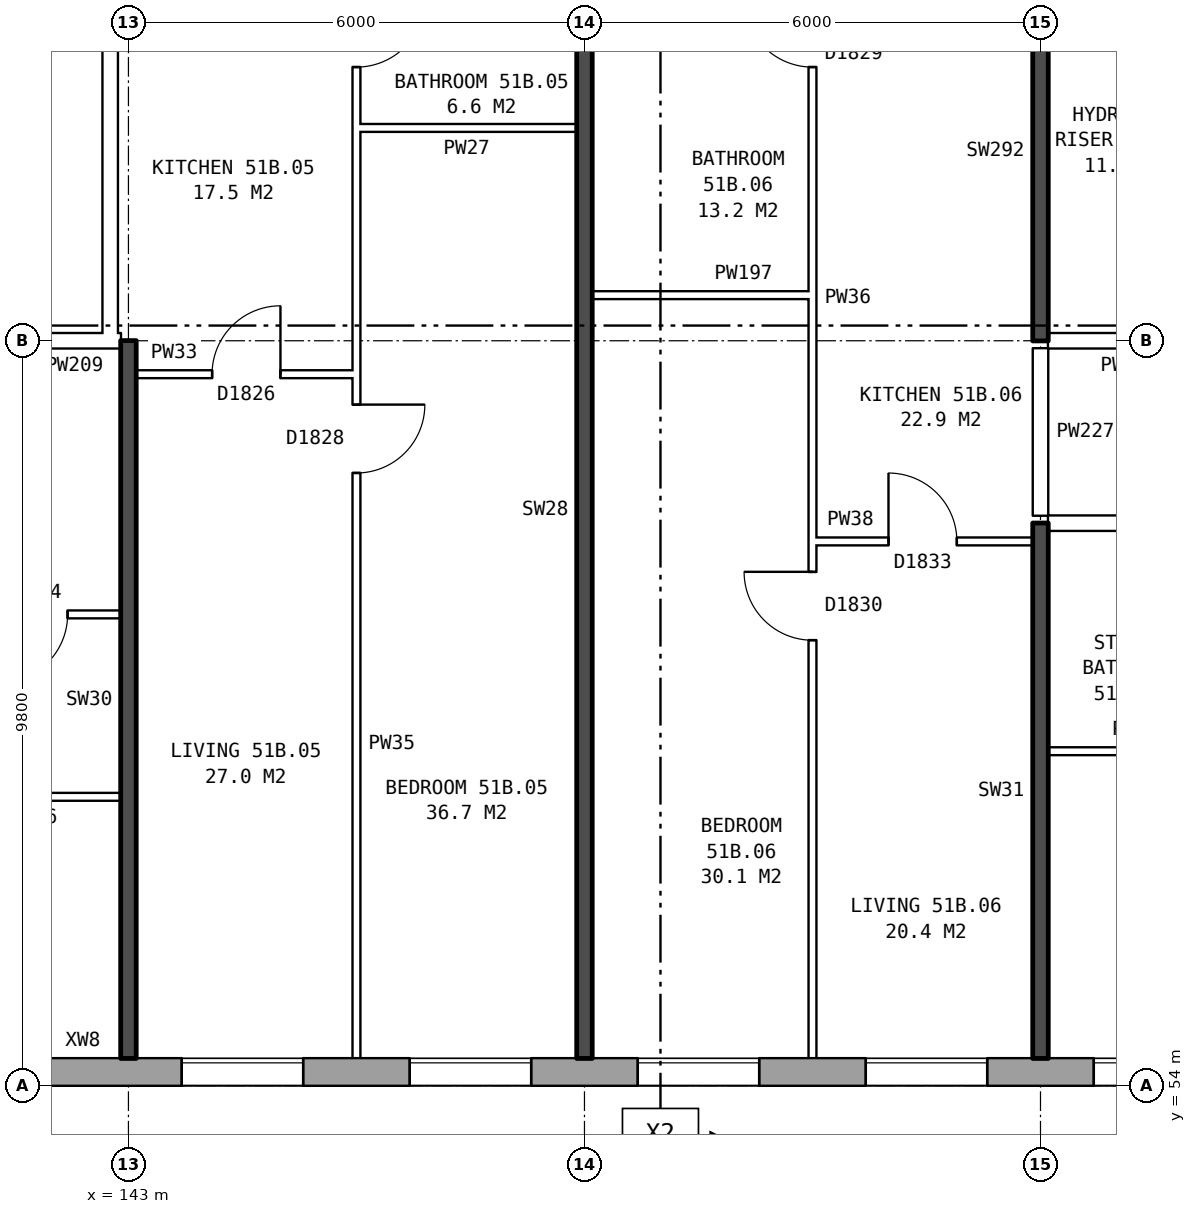
"""IFC4 building model, lengths in metres.
Left out: names, types, materials, properties, quantities, classifications, styles, units other than length and angle.
Written with IfcOpenShell. Run it as: python <this file> out.ifc"""

import sys

from ifc_helpers import new_model, si_unit, direction, frame, frame_2d, origin, place, context, subcontext, project, spatial, rectangle, extrude, element, fill, save


model = new_model("IFC4")
c1 = context("Model", 3, precision=1e-05, world=origin(), true_north=direction((0.0, 1.0)))
c2 = subcontext(c1, "Body", "Model", "MODEL_VIEW")
j1 = project(units=[si_unit("LENGTHUNIT", "METRE"), si_unit("PLANEANGLEUNIT", "RADIAN")], contexts=[c1])
p1 = place(None, origin())
s1 = spatial("IfcSite", under=j1, at=p1, CompositionType="ELEMENT")
p2 = place(p1, origin())
s2 = spatial("IfcBuilding", under=s1, at=p2, CompositionType="ELEMENT")
p3 = place(p2, frame((0.0, 0.0, 182.0)))
s3 = spatial("IfcBuildingStorey", under=s2, at=p3, CompositionType="ELEMENT", Elevation=182.0)
p4 = place(p3, frame((134.075, 54.18, 0.0), z_axis=(0.0, 0.0, 1.0), x_axis=(1.0, 0.0, 0.0)))
e1 = element("IfcWall", 1, at=p4, inside=s3, PredefinedType="STANDARD", context=c2, shape_type="SweptSolid", body=[
    extrude(rectangle(XDim=33.101, YDim=0.36, at=frame_2d((16.55, 0.0))), origin(), (0.0, 0.0, 1.0), 2.85),
])
p5 = place(p4, frame((0.625, 0.0, 0.8)))
e2 = element("IfcOpeningElement", 2, at=p5, cuts=e1, PredefinedType="OPENING", context=c2, shape_type="SweptSolid", body=[
    extrude(rectangle(XDim=1.6, YDim=1.8, at=frame_2d((0.8, 0.9))), frame((0.0, 0.19, 0.0), z_axis=(0.0, -1.0, 0.0), x_axis=(1.0, 0.0, 0.0)), (0.0, 0.0, 1.0), 0.38),
])
p6 = place(p4, frame((3.625, 0.0, 0.8)))
e3 = element("IfcOpeningElement", 3, at=p6, cuts=e1, PredefinedType="OPENING", context=c2, shape_type="SweptSolid", body=[
    extrude(rectangle(XDim=1.6, YDim=1.8, at=frame_2d((0.8, 0.9))), frame((0.0, 0.19, 0.0), z_axis=(0.0, -1.0, 0.0), x_axis=(1.0, 0.0, 0.0)), (0.0, 0.0, 1.0), 0.38),
])
p7 = place(p4, frame((5.525, 0.0, 0.8)))
e4 = element("IfcOpeningElement", 4, at=p7, cuts=e1, PredefinedType="OPENING", context=c2, shape_type="SweptSolid", body=[
    extrude(rectangle(XDim=0.6, YDim=1.8, at=frame_2d((0.3, 0.9))), frame((0.0, 0.19, 0.0), z_axis=(0.0, -1.0, 0.0), x_axis=(1.0, 0.0, 0.0)), (0.0, 0.0, 1.0), 0.38),
])
p8 = place(p4, frame((9.625, 0.0, 0.8)))
e5 = element("IfcOpeningElement", 5, at=p8, cuts=e1, PredefinedType="OPENING", context=c2, shape_type="SweptSolid", body=[
    extrude(rectangle(XDim=1.6, YDim=1.8, at=frame_2d((0.8, 0.9))), frame((0.0, 0.19, 0.0), z_axis=(0.0, -1.0, 0.0), x_axis=(1.0, 0.0, 0.0)), (0.0, 0.0, 1.0), 0.38),
])
p9 = place(p4, frame((12.625, 0.0, 0.8)))
e6 = element("IfcOpeningElement", 6, at=p9, cuts=e1, PredefinedType="OPENING", context=c2, shape_type="SweptSolid", body=[
    extrude(rectangle(XDim=1.6, YDim=1.8, at=frame_2d((0.8, 0.9))), frame((0.0, 0.19, 0.0), z_axis=(0.0, -1.0, 0.0), x_axis=(1.0, 0.0, 0.0)), (0.0, 0.0, 1.0), 0.38),
])
p10 = place(p4, frame((15.625, 0.0, 0.8)))
e7 = element("IfcOpeningElement", 7, at=p10, cuts=e1, PredefinedType="OPENING", context=c2, shape_type="SweptSolid", body=[
    extrude(rectangle(XDim=1.6, YDim=1.8, at=frame_2d((0.8, 0.9))), frame((0.0, 0.19, 0.0), z_axis=(0.0, -1.0, 0.0), x_axis=(1.0, 0.0, 0.0)), (0.0, 0.0, 1.0), 0.38),
])
p11 = place(p4, frame((18.625, 0.0, 0.8)))
e8 = element("IfcOpeningElement", 8, at=p11, cuts=e1, PredefinedType="OPENING", context=c2, shape_type="SweptSolid", body=[
    extrude(rectangle(XDim=1.6, YDim=1.8, at=frame_2d((0.8, 0.9))), frame((0.0, 0.19, 0.0), z_axis=(0.0, -1.0, 0.0), x_axis=(1.0, 0.0, 0.0)), (0.0, 0.0, 1.0), 0.38),
])
p12 = place(p4, frame((21.625, 0.0, 0.8)))
e9 = element("IfcOpeningElement", 9, at=p12, cuts=e1, PredefinedType="OPENING", context=c2, shape_type="SweptSolid", body=[
    extrude(rectangle(XDim=1.6, YDim=1.8, at=frame_2d((0.8, 0.9))), frame((0.0, 0.19, 0.0), z_axis=(0.0, -1.0, 0.0), x_axis=(1.0, 0.0, 0.0)), (0.0, 0.0, 1.0), 0.38),
])
p13 = place(p4, frame((23.525, 0.0, 0.8)))
e10 = element("IfcOpeningElement", 10, at=p13, cuts=e1, PredefinedType="OPENING", context=c2, shape_type="SweptSolid", body=[
    extrude(rectangle(XDim=1.4, YDim=0.9, at=frame_2d((0.7, 0.45))), frame((0.0, 0.19, 0.0), z_axis=(0.0, -1.0, 0.0), x_axis=(1.0, 0.0, 0.0)), (0.0, 0.0, 1.0), 0.38),
])
p14 = place(p4, frame((27.625, 0.0, 0.8)))
e11 = element("IfcOpeningElement", 11, at=p14, cuts=e1, PredefinedType="OPENING", context=c2, shape_type="SweptSolid", body=[
    extrude(rectangle(XDim=1.6, YDim=1.8, at=frame_2d((0.8, 0.9))), frame((0.0, 0.19, 0.0), z_axis=(0.0, -1.0, 0.0), x_axis=(1.0, 0.0, 0.0)), (0.0, 0.0, 1.0), 0.38),
])
p15 = place(p4, frame((30.625, 0.0, 0.8)))
e12 = element("IfcOpeningElement", 12, at=p15, cuts=e1, PredefinedType="OPENING", context=c2, shape_type="SweptSolid", body=[
    extrude(rectangle(XDim=1.6, YDim=1.8, at=frame_2d((0.8, 0.9))), frame((0.0, 0.19, 0.0), z_axis=(0.0, -1.0, 0.0), x_axis=(1.0, 0.0, 0.0)), (0.0, 0.0, 1.0), 0.38),
])
p16 = place(p4, frame((6.425, 0.0, 1.6)))
e13 = element("IfcOpeningElement", 13, at=p16, cuts=e1, PredefinedType="OPENING", context=c2, shape_type="SweptSolid", body=[
    extrude(rectangle(XDim=0.6, YDim=0.9, at=frame_2d((0.3, 0.45))), frame((0.0, 0.19, 0.0), z_axis=(0.0, -1.0, 0.0), x_axis=(1.0, 0.0, 0.0)), (0.0, 0.0, 1.0), 0.38),
])
p17 = place(p4, frame((25.975, 0.0, 1.7)))
e14 = element("IfcOpeningElement", 14, at=p17, cuts=e1, PredefinedType="OPENING", context=c2, shape_type="SweptSolid", body=[
    extrude(rectangle(XDim=0.6, YDim=0.9, at=frame_2d((0.3, 0.45))), frame((0.0, 0.19, 0.0), z_axis=(0.0, -1.0, 0.0), x_axis=(1.0, 0.0, 0.0)), (0.0, 0.0, 1.0), 0.38),
])
p18 = place(p3, frame((142.76, 63.9, 0.0), z_axis=(0.0, 0.0, 1.0), x_axis=(0.0, 1.0, 0.0)))
e15 = element("IfcWall", 15, at=p18, inside=s3, PredefinedType="PARTITIONING", context=c2, shape_type="SweptSolid", body=[
    extrude(rectangle(XDim=12.2, YDim=0.2, at=frame_2d((6.1, 0.0))), origin(), (0.0, 0.0, 1.0), 2.85),
])
p19 = place(p18, frame((5.1, 0.0, 0.0)))
e16 = element("IfcOpeningElement", 16, at=p19, cuts=e15, PredefinedType="OPENING", context=c2, shape_type="SweptSolid", body=[
    extrude(rectangle(XDim=2.0, YDim=2.1, at=frame_2d((1.0, 1.05))), frame((0.0, 0.11, 0.0), z_axis=(0.0, -1.0, 0.0), x_axis=(1.0, 0.0, 0.0)), (0.0, 0.0, 1.0), 0.22),
])
for number, where, z_axis, x_axis in (
    (17, (140.6, 57.8, 0.0), (0.0, 0.0, 1.0), (1.0, 0.0, 0.0)),
    (18, (155.1, 58.4, 0.0), (0.0, 0.0, 1.0), (1.0, 0.0, 0.0)),
):
    element("IfcWall", number, at=place(p3, frame(where, z_axis=z_axis, x_axis=x_axis)), inside=s3, PredefinedType="PARTITIONING", context=c2, shape_type="SweptSolid", body=[
        extrude(rectangle(XDim=2.3, YDim=0.1, at=frame_2d((1.15, 0.0))), origin(), (0.0, 0.0, 1.0), 2.85),
    ])
p20 = place(p3, frame((137.1, 60.2, 0.0), z_axis=(0.0, 0.0, 1.0), x_axis=(1.0, 0.0, 0.0)))
e19 = element("IfcWall", 19, at=p20, inside=s3, PredefinedType="PARTITIONING", context=c2, shape_type="SweptSolid", body=[
    extrude(rectangle(XDim=5.8, YDim=0.1, at=frame_2d((2.9, 0.0))), origin(), (0.0, 0.0, 1.0), 2.85),
])
p21 = place(p20, frame((1.3, 0.0, 0.0)))
e20 = element("IfcOpeningElement", 20, at=p21, cuts=e19, PredefinedType="OPENING", context=c2, shape_type="SweptSolid", body=[
    extrude(rectangle(XDim=0.9, YDim=2.1, at=frame_2d((0.45, 1.05))), frame((0.0, 0.06, 0.0), z_axis=(0.0, -1.0, 0.0), x_axis=(1.0, 0.0, 0.0)), (0.0, 0.0, 1.0), 0.12),
])
p22 = place(p20, frame((4.2, 0.0, 0.0)))
e21 = element("IfcOpeningElement", 21, at=p22, cuts=e19, PredefinedType="OPENING", context=c2, shape_type="SweptSolid", body=[
    extrude(rectangle(XDim=0.9, YDim=2.1, at=frame_2d((0.45, 1.05))), frame((0.0, 0.06, 0.0), z_axis=(0.0, -1.0, 0.0), x_axis=(1.0, 0.0, 0.0)), (0.0, 0.0, 1.0), 0.12),
])
p23 = place(p3, frame((152.0, 61.16, 0.0), z_axis=(0.0, 0.0, 1.0), x_axis=(1.0, 0.0, 0.0)))
e22 = element("IfcWall", 22, at=p23, inside=s3, PredefinedType="PARTITIONING", context=c2, shape_type="SweptSolid", body=[
    extrude(rectangle(XDim=2.9, YDim=0.1, at=frame_2d((1.45, 0.0))), origin(), (0.0, 0.0, 1.0), 2.85),
])
p24 = place(p23, frame((1.0, 0.0, 0.0)))
e23 = element("IfcOpeningElement", 23, at=p24, cuts=e22, PredefinedType="OPENING", context=c2, shape_type="SweptSolid", body=[
    extrude(rectangle(XDim=0.9, YDim=2.1, at=frame_2d((0.45, 1.05))), frame((0.0, 0.06, 0.0), z_axis=(0.0, -1.0, 0.0), x_axis=(1.0, 0.0, 0.0)), (0.0, 0.0, 1.0), 0.12),
])
p25 = place(p3, frame((155.1, 61.4, 0.0), z_axis=(0.0, 0.0, 1.0), x_axis=(1.0, 0.0, 0.0)))
e24 = element("IfcWall", 24, at=p25, inside=s3, PredefinedType="PARTITIONING", context=c2, shape_type="SweptSolid", body=[
    extrude(rectangle(XDim=14.79, YDim=0.2, at=frame_2d((7.395, 0.0))), origin(), (0.0, 0.0, 1.0), 2.85),
])
p26 = place(p25, frame((3.6, 0.0, 0.0)))
e25 = element("IfcOpeningElement", 25, at=p26, cuts=e24, PredefinedType="OPENING", context=c2, shape_type="SweptSolid", body=[
    extrude(rectangle(XDim=1.0, YDim=2.1, at=frame_2d((0.5, 1.05))), frame((0.0, 0.11, 0.0), z_axis=(0.0, -1.0, 0.0), x_axis=(1.0, 0.0, 0.0)), (0.0, 0.0, 1.0), 0.22),
])
p27 = place(p25, frame((11.045, 0.0, 0.0)))
e26 = element("IfcOpeningElement", 26, at=p27, cuts=e24, PredefinedType="OPENING", context=c2, shape_type="SweptSolid", body=[
    extrude(rectangle(XDim=1.0, YDim=2.1, at=frame_2d((0.5, 1.05))), frame((0.0, 0.11, 0.0), z_axis=(0.0, -1.0, 0.0), x_axis=(1.0, 0.0, 0.0)), (0.0, 0.0, 1.0), 0.22),
])
p28 = place(p3, frame((143.1, 63.36, 0.0), z_axis=(0.0, 0.0, 1.0), x_axis=(1.0, 0.0, 0.0)))
e27 = element("IfcWall", 27, at=p28, inside=s3, PredefinedType="PARTITIONING", context=c2, shape_type="SweptSolid", body=[
    extrude(rectangle(XDim=2.9, YDim=0.1, at=frame_2d((1.45, 0.0))), origin(), (0.0, 0.0, 1.0), 2.85),
])
p29 = place(p28, frame((1.0, 0.0, 0.0)))
e28 = element("IfcOpeningElement", 28, at=p29, cuts=e27, PredefinedType="OPENING", context=c2, shape_type="SweptSolid", body=[
    extrude(rectangle(XDim=0.9, YDim=2.1, at=frame_2d((0.45, 1.05))), frame((0.0, 0.06, 0.0), z_axis=(0.0, -1.0, 0.0), x_axis=(1.0, 0.0, 0.0)), (0.0, 0.0, 1.0), 0.12),
])
p30 = place(p3, frame((139.76, 63.8, 0.0), z_axis=(0.0, 0.0, 1.0), x_axis=(1.0, 0.0, 0.0)))
e29 = element("IfcWall", 29, at=p30, inside=s3, PredefinedType="PARTITIONING", context=c2, shape_type="SweptSolid", body=[
    extrude(rectangle(XDim=3.0, YDim=0.2, at=frame_2d((1.5, 0.0))), origin(), (0.0, 0.0, 1.0), 2.85),
])
p31 = place(p30, frame((1.0, 0.0, 0.0)))
e30 = element("IfcOpeningElement", 30, at=p31, cuts=e29, PredefinedType="OPENING", context=c2, shape_type="SweptSolid", body=[
    extrude(rectangle(XDim=1.0, YDim=2.1, at=frame_2d((0.5, 1.05))), frame((0.0, 0.11, 0.0), z_axis=(0.0, -1.0, 0.0), x_axis=(1.0, 0.0, 0.0)), (0.0, 0.0, 1.0), 0.22),
])
p32 = place(p3, frame((142.76, 63.8, 0.0), z_axis=(0.0, 0.0, 1.0), x_axis=(1.0, 0.0, 0.0)))
e31 = element("IfcWall", 31, at=p32, inside=s3, PredefinedType="PARTITIONING", context=c2, shape_type="SweptSolid", body=[
    extrude(rectangle(XDim=0.14, YDim=0.2, at=frame_2d((0.07, 0.0))), origin(), (0.0, 0.0, 1.0), 2.85),
])
p33 = place(p3, frame((155.1, 63.8, 0.0), z_axis=(0.0, 0.0, 1.0), x_axis=(1.0, 0.0, 0.0)))
e32 = element("IfcWall", 32, at=p33, inside=s3, PredefinedType="PARTITIONING", context=c2, shape_type="SweptSolid", body=[
    extrude(rectangle(XDim=2.14, YDim=0.2, at=frame_2d((1.07, 0.0))), origin(), (0.0, 0.0, 1.0), 2.85),
])
for number, where, z_axis, x_axis in (
    (33, (149.1, 64.4, 0.0), (0.0, 0.0, 1.0), (1.0, 0.0, 0.0)),
    (34, (146.0, 66.6, 0.0), (0.0, 0.0, 1.0), (1.0, 0.0, 0.0)),
):
    element("IfcWall", number, at=place(p3, frame(where, z_axis=z_axis, x_axis=x_axis)), inside=s3, PredefinedType="PARTITIONING", context=c2, shape_type="SweptSolid", body=[
        extrude(rectangle(XDim=2.9, YDim=0.1, at=frame_2d((1.45, 0.0))), origin(), (0.0, 0.0, 1.0), 2.85),
    ])
p34 = place(p3, frame((143.0, 54.36, 0.0), z_axis=(0.0, 0.0, 1.0), x_axis=(0.0, 1.0, 0.0)))
e35 = element("IfcWall", 35, at=p34, inside=s3, PredefinedType="SOLIDWALL", context=c2, shape_type="SweptSolid", body=[
    extrude(rectangle(XDim=9.44, YDim=0.2, at=frame_2d((4.72, 0.0))), origin(), (0.0, 0.0, 1.0), 2.85),
])
p35 = place(p3, frame((146.0, 54.36, 0.0), z_axis=(0.0, 0.0, 1.0), x_axis=(0.0, 1.0, 0.0)))
e36 = element("IfcWall", 36, at=p35, inside=s3, PredefinedType="PARTITIONING", context=c2, shape_type="SweptSolid", body=[
    extrude(rectangle(XDim=14.34, YDim=0.1, at=frame_2d((7.17, 0.0))), origin(), (0.0, 0.0, 1.0), 2.85),
])
p36 = place(p35, frame((7.7, 0.0, 0.0)))
e37 = element("IfcOpeningElement", 37, at=p36, cuts=e36, PredefinedType="OPENING", context=c2, shape_type="SweptSolid", body=[
    extrude(rectangle(XDim=0.9, YDim=2.1, at=frame_2d((0.45, 1.05))), frame((0.0, 0.06, 0.0), z_axis=(0.0, -1.0, 0.0), x_axis=(1.0, 0.0, 0.0)), (0.0, 0.0, 1.0), 0.12),
])
p37 = place(p35, frame((13.04, 0.0, 0.0)))
e38 = element("IfcOpeningElement", 38, at=p37, cuts=e36, PredefinedType="OPENING", context=c2, shape_type="SweptSolid", body=[
    extrude(rectangle(XDim=0.9, YDim=2.1, at=frame_2d((0.45, 1.05))), frame((0.0, 0.06, 0.0), z_axis=(0.0, -1.0, 0.0), x_axis=(1.0, 0.0, 0.0)), (0.0, 0.0, 1.0), 0.12),
])
p38 = place(p3, frame((149.0, 54.36, 0.0), z_axis=(0.0, 0.0, 1.0), x_axis=(0.0, 1.0, 0.0)))
e39 = element("IfcWall", 39, at=p38, inside=s3, PredefinedType="SOLIDWALL", context=c2, shape_type="SweptSolid", body=[
    extrude(rectangle(XDim=14.44, YDim=0.2, at=frame_2d((7.22, 0.0))), origin(), (0.0, 0.0, 1.0), 2.85),
])
p39 = place(p3, frame((152.0, 54.36, 0.0), z_axis=(0.0, 0.0, 1.0), x_axis=(0.0, 1.0, 0.0)))
e40 = element("IfcWall", 40, at=p39, inside=s3, PredefinedType="PARTITIONING", context=c2, shape_type="SweptSolid", body=[
    extrude(rectangle(XDim=14.34, YDim=0.1, at=frame_2d((7.17, 0.0))), origin(), (0.0, 0.0, 1.0), 2.85),
])
p40 = place(p39, frame((5.5, 0.0, 0.0)))
e41 = element("IfcOpeningElement", 41, at=p40, cuts=e40, PredefinedType="OPENING", context=c2, shape_type="SweptSolid", body=[
    extrude(rectangle(XDim=0.9, YDim=2.1, at=frame_2d((0.45, 1.05))), frame((0.0, 0.06, 0.0), z_axis=(0.0, -1.0, 0.0), x_axis=(1.0, 0.0, 0.0)), (0.0, 0.0, 1.0), 0.12),
])
p41 = place(p39, frame((13.04, 0.0, 0.0)))
e42 = element("IfcOpeningElement", 42, at=p41, cuts=e40, PredefinedType="OPENING", context=c2, shape_type="SweptSolid", body=[
    extrude(rectangle(XDim=0.9, YDim=2.1, at=frame_2d((0.45, 1.05))), frame((0.0, 0.06, 0.0), z_axis=(0.0, -1.0, 0.0), x_axis=(1.0, 0.0, 0.0)), (0.0, 0.0, 1.0), 0.12),
])
p42 = place(p3, frame((155.0, 54.36, 0.0), z_axis=(0.0, 0.0, 1.0), x_axis=(0.0, 1.0, 0.0)))
e43 = element("IfcWall", 43, at=p42, inside=s3, PredefinedType="SOLIDWALL", context=c2, shape_type="SweptSolid", body=[
    extrude(rectangle(XDim=7.04, YDim=0.2, at=frame_2d((3.52, 0.0))), origin(), (0.0, 0.0, 1.0), 2.85),
])
p43 = place(p3, frame((155.0, 61.5, 0.0), z_axis=(0.0, 0.0, 1.0), x_axis=(0.0, 1.0, 0.0)))
e44 = element("IfcWall", 44, at=p43, inside=s3, PredefinedType="PARTITIONING", context=c2, shape_type="SweptSolid", body=[
    extrude(rectangle(XDim=2.2, YDim=0.2, at=frame_2d((1.1, 0.0))), origin(), (0.0, 0.0, 1.0), 2.85),
])
p44 = place(p3, frame((155.0, 63.8, 0.0), z_axis=(0.0, 0.0, 1.0), x_axis=(0.0, 1.0, 0.0)))
e45 = element("IfcWall", 45, at=p44, inside=s3, PredefinedType="SOLIDWALL", context=c2, shape_type="SweptSolid", body=[
    extrude(rectangle(XDim=5.0, YDim=0.2, at=frame_2d((2.5, 0.0))), origin(), (0.0, 0.0, 1.0), 2.85),
])
p45 = place(p8, origin())
e46 = element("IfcWindow", 46, at=p45, inside=s3, PartitioningType="SINGLE_PANEL", PredefinedType="WINDOW", context=c2, shape_type="SweptSolid", body=[
    extrude(rectangle(XDim=1.6, YDim=1.8, at=frame_2d((0.8, 0.9))), frame((0.0, 0.15, 0.0), z_axis=(0.0, -1.0, 0.0), x_axis=(1.0, 0.0, 0.0)), (0.0, 0.0, 1.0), 0.06),
])
fill(e5, e46)
p46 = place(p9, origin())
e47 = element("IfcWindow", 47, at=p46, inside=s3, PartitioningType="SINGLE_PANEL", PredefinedType="WINDOW", context=c2, shape_type="SweptSolid", body=[
    extrude(rectangle(XDim=1.6, YDim=1.8, at=frame_2d((0.8, 0.9))), frame((0.0, 0.15, 0.0), z_axis=(0.0, -1.0, 0.0), x_axis=(1.0, 0.0, 0.0)), (0.0, 0.0, 1.0), 0.06),
])
fill(e6, e47)
p47 = place(p10, origin())
e48 = element("IfcWindow", 48, at=p47, inside=s3, PartitioningType="SINGLE_PANEL", PredefinedType="WINDOW", context=c2, shape_type="SweptSolid", body=[
    extrude(rectangle(XDim=1.6, YDim=1.8, at=frame_2d((0.8, 0.9))), frame((0.0, 0.15, 0.0), z_axis=(0.0, -1.0, 0.0), x_axis=(1.0, 0.0, 0.0)), (0.0, 0.0, 1.0), 0.06),
])
fill(e7, e48)
p48 = place(p11, origin())
e49 = element("IfcWindow", 49, at=p48, inside=s3, PartitioningType="SINGLE_PANEL", PredefinedType="WINDOW", context=c2, shape_type="SweptSolid", body=[
    extrude(rectangle(XDim=1.6, YDim=1.8, at=frame_2d((0.8, 0.9))), frame((0.0, 0.15, 0.0), z_axis=(0.0, -1.0, 0.0), x_axis=(1.0, 0.0, 0.0)), (0.0, 0.0, 1.0), 0.06),
])
fill(e8, e49)
p49 = place(p12, origin())
e50 = element("IfcWindow", 50, at=p49, inside=s3, PartitioningType="SINGLE_PANEL", PredefinedType="WINDOW", context=c2, shape_type="SweptSolid", body=[
    extrude(rectangle(XDim=1.6, YDim=1.8, at=frame_2d((0.8, 0.9))), frame((0.0, 0.15, 0.0), z_axis=(0.0, -1.0, 0.0), x_axis=(1.0, 0.0, 0.0)), (0.0, 0.0, 1.0), 0.06),
])
fill(e9, e50)
p50 = place(p22, frame((0.9, 0.0, 0.0), z_axis=(0.0, 0.0, 1.0), x_axis=(-1.0, 0.0, 0.0)))
e51 = element("IfcDoor", 51, at=p50, inside=s3, OperationType="SINGLE_SWING_RIGHT", PredefinedType="DOOR", context=c2, shape_type="SweptSolid", body=[
    extrude(rectangle(XDim=0.9, YDim=2.1, at=frame_2d((0.45, 1.05))), frame((0.0, 0.025, 0.0), z_axis=(0.0, -1.0, 0.0), x_axis=(1.0, 0.0, 0.0)), (0.0, 0.0, 1.0), 0.05),
])
fill(e21, e51)
p51 = place(p36, frame((0.9, 0.0, 0.0), z_axis=(0.0, 0.0, 1.0), x_axis=(-1.0, 0.0, 0.0)))
e52 = element("IfcDoor", 52, at=p51, inside=s3, OperationType="SINGLE_SWING_LEFT", PredefinedType="DOOR", context=c2, shape_type="SweptSolid", body=[
    extrude(rectangle(XDim=0.9, YDim=2.1, at=frame_2d((0.45, 1.05))), frame((0.0, 0.025, 0.0), z_axis=(0.0, -1.0, 0.0), x_axis=(1.0, 0.0, 0.0)), (0.0, 0.0, 1.0), 0.05),
])
fill(e37, e52)
p52 = place(p29, origin())
e53 = element("IfcDoor", 53, at=p52, inside=s3, OperationType="SINGLE_SWING_RIGHT", PredefinedType="DOOR", context=c2, shape_type="SweptSolid", body=[
    extrude(rectangle(XDim=0.9, YDim=2.1, at=frame_2d((0.45, 1.05))), frame((0.0, 0.025, 0.0), z_axis=(0.0, -1.0, 0.0), x_axis=(1.0, 0.0, 0.0)), (0.0, 0.0, 1.0), 0.05),
])
fill(e28, e53)
p53 = place(p37, frame((0.9, 0.0, 0.0), z_axis=(0.0, 0.0, 1.0), x_axis=(-1.0, 0.0, 0.0)))
e54 = element("IfcDoor", 54, at=p53, inside=s3, OperationType="SINGLE_SWING_LEFT", PredefinedType="DOOR", context=c2, shape_type="SweptSolid", body=[
    extrude(rectangle(XDim=0.9, YDim=2.1, at=frame_2d((0.45, 1.05))), frame((0.0, 0.025, 0.0), z_axis=(0.0, -1.0, 0.0), x_axis=(1.0, 0.0, 0.0)), (0.0, 0.0, 1.0), 0.05),
])
fill(e38, e54)
p54 = place(p40, origin())
e55 = element("IfcDoor", 55, at=p54, inside=s3, OperationType="SINGLE_SWING_RIGHT", PredefinedType="DOOR", context=c2, shape_type="SweptSolid", body=[
    extrude(rectangle(XDim=0.9, YDim=2.1, at=frame_2d((0.45, 1.05))), frame((0.0, 0.025, 0.0), z_axis=(0.0, -1.0, 0.0), x_axis=(1.0, 0.0, 0.0)), (0.0, 0.0, 1.0), 0.05),
])
fill(e41, e55)
p55 = place(p24, origin())
e56 = element("IfcDoor", 56, at=p55, inside=s3, OperationType="SINGLE_SWING_LEFT", PredefinedType="DOOR", context=c2, shape_type="SweptSolid", body=[
    extrude(rectangle(XDim=0.9, YDim=2.1, at=frame_2d((0.45, 1.05))), frame((0.0, 0.025, 0.0), z_axis=(0.0, -1.0, 0.0), x_axis=(1.0, 0.0, 0.0)), (0.0, 0.0, 1.0), 0.05),
])
fill(e23, e56)
p56 = place(p41, origin())
e57 = element("IfcDoor", 57, at=p56, inside=s3, OperationType="SINGLE_SWING_RIGHT", PredefinedType="DOOR", context=c2, shape_type="SweptSolid", body=[
    extrude(rectangle(XDim=0.9, YDim=2.1, at=frame_2d((0.45, 1.05))), frame((0.0, 0.025, 0.0), z_axis=(0.0, -1.0, 0.0), x_axis=(1.0, 0.0, 0.0)), (0.0, 0.0, 1.0), 0.05),
])
fill(e42, e57)
save(model, sys.argv[1])
